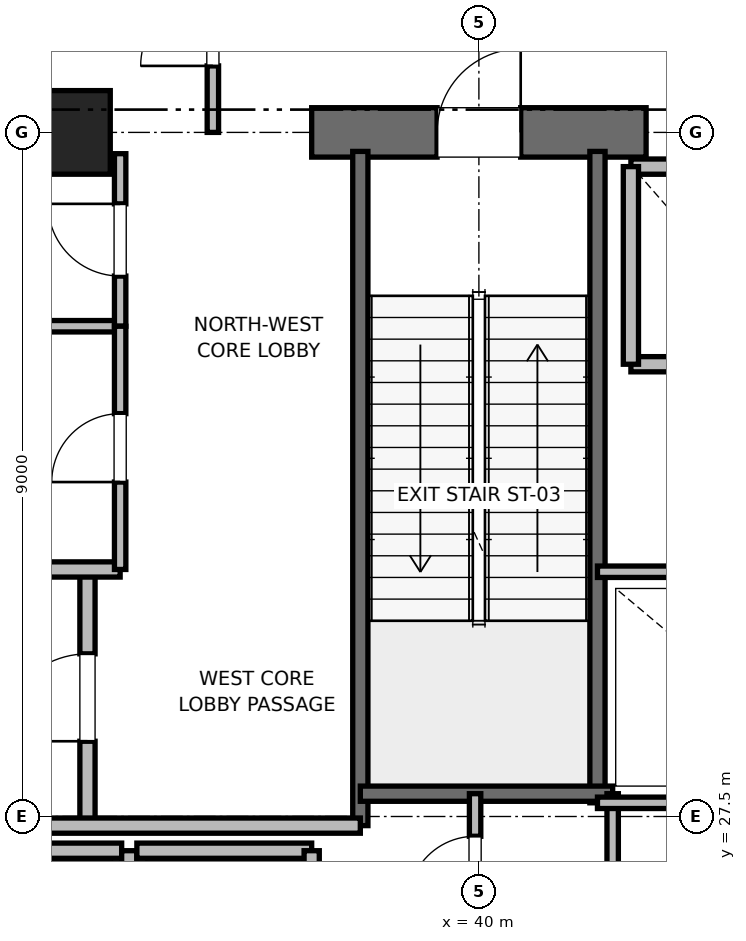
"""IFC4 building model, lengths in metres.
Left out: names, types, materials, properties, quantities, classifications, styles, units other than length and angle.
Written with IfcOpenShell. Run it as: python <this file> out.ifc"""

import sys

from ifc_helpers import new_model, si_unit, direction, frame, frame_2d, origin, origin_2d, place, context, subcontext, project, spatial, rectangle, extrude, element, fill, save


model = new_model("IFC4")
c1 = context("Model", 3, precision=1e-05, world=origin(), true_north=direction((0.0, 1.0)))
c2 = subcontext(c1, "Body", "Model", "MODEL_VIEW")
j1 = project(units=[si_unit("LENGTHUNIT", "METRE"), si_unit("PLANEANGLEUNIT", "RADIAN")], contexts=[c1])
p1 = place(None, origin())
s1 = spatial("IfcSite", under=j1, at=p1, CompositionType="ELEMENT")
p2 = place(p1, origin())
s2 = spatial("IfcBuilding", under=s1, at=p2, CompositionType="ELEMENT")
p3 = place(p2, frame((0.0, 0.0, 107.6)))
s3 = spatial("IfcBuildingStorey", under=s2, at=p3, CompositionType="ELEMENT", Elevation=107.6)
p4 = place(p3, frame((34.6, 36.5, 0.0), z_axis=(0.0, 0.0, 1.0), x_axis=(1.0, 0.0, 0.0)))
e1 = element("IfcColumn", 1, at=p4, inside=s3, PredefinedType="PILASTER", context=c2, shape_type="SweptSolid", body=[
    extrude(rectangle(XDim=1.1, YDim=1.1, at=origin_2d()), origin(), (0.0, 0.0, 1.0), 5.4),
])
p5 = place(p3, frame((29.0, 36.5, 0.0), z_axis=(0.0, 0.0, 1.0), x_axis=(1.0, 0.0, 0.0)))
e2 = element("IfcWall", 2, at=p5, inside=s3, PredefinedType="SHEAR", context=c2, shape_type="SweptSolid", body=[
    extrude(rectangle(XDim=5.8, YDim=0.65, at=frame_2d((2.9, 0.0))), origin(), (0.0, 0.0, 1.0), 5.1),
])
p6 = place(p3, frame((37.8, 36.5, 0.0), z_axis=(0.0, 0.0, 1.0), x_axis=(1.0, 0.0, 0.0)))
e3 = element("IfcWall", 3, at=p6, inside=s3, PredefinedType="SHEAR", context=c2, shape_type="SweptSolid", body=[
    extrude(rectangle(XDim=4.4, YDim=0.65, at=frame_2d((2.2, 0.0))), origin(), (0.0, 0.0, 1.0), 5.1),
])
p7 = place(p6, frame((1.65, 0.0, 0.0)))
e4 = element("IfcOpeningElement", 4, at=p7, cuts=e3, PredefinedType="OPENING", context=c2, shape_type="SweptSolid", body=[
    extrude(rectangle(XDim=1.1, YDim=2.15, at=frame_2d((0.55, 1.075))), frame((0.0, 0.325, 0.0), z_axis=(0.0, -1.0, 0.0), x_axis=(1.0, 0.0, 0.0)), (0.0, 0.0, 1.0), 0.65),
])
p8 = place(p3, frame((38.44, 27.38, 0.0), z_axis=(0.0, 0.0, 1.0), x_axis=(0.0, 1.0, 0.0)))
e5 = element("IfcWall", 5, at=p8, inside=s3, PredefinedType="SOLIDWALL", context=c2, shape_type="SweptSolid", body=[
    extrude(rectangle(XDim=8.87, YDim=0.2, at=frame_2d((4.435, 0.0))), origin(), (0.0, 0.0, 1.0), 5.1),
])
p9 = place(p3, frame((41.56, 27.68, 0.0), z_axis=(0.0, 0.0, 1.0), x_axis=(0.0, 1.0, 0.0)))
e6 = element("IfcWall", 6, at=p9, inside=s3, PredefinedType="SOLIDWALL", context=c2, shape_type="SweptSolid", body=[
    extrude(rectangle(XDim=8.57, YDim=0.2, at=frame_2d((4.285, 0.0))), origin(), (0.0, 0.0, 1.0), 5.1),
])
p10 = place(p3, frame((38.44, 27.8, 0.0), z_axis=(0.0, 0.0, 1.0), x_axis=(1.0, 0.0, 0.0)))
e7 = element("IfcWall", 7, at=p10, inside=s3, PredefinedType="SOLIDWALL", context=c2, shape_type="SweptSolid", body=[
    extrude(rectangle(XDim=3.32, YDim=0.2, at=frame_2d((1.66, 0.0))), origin(), (0.0, 0.0, 1.0), 5.1),
])
p11 = place(p3, frame((34.85, 27.38, 0.0), z_axis=(0.0, 0.0, 1.0), x_axis=(0.0, 1.0, 0.0)))
e8 = element("IfcWall", 8, at=p11, inside=s3, PredefinedType="PARTITIONING", context=c2, shape_type="SweptSolid", body=[
    extrude(rectangle(XDim=3.37, YDim=0.2, at=frame_2d((1.685, 0.0))), origin(), (0.0, 0.0, 1.0), 5.1),
])
p12 = place(p11, frame((1.11, 0.0, 0.0)))
e9 = element("IfcOpeningElement", 9, at=p12, cuts=e8, PredefinedType="OPENING", context=c2, shape_type="SweptSolid", body=[
    extrude(rectangle(XDim=1.15, YDim=2.2, at=frame_2d((0.575, 1.1))), frame((0.0, 0.1, 0.0), z_axis=(0.0, -1.0, 0.0), x_axis=(1.0, 0.0, 0.0)), (0.0, 0.0, 1.0), 0.2),
])
p13 = place(p3, frame((32.82, 27.38, 0.0), z_axis=(0.0, 0.0, 1.0), x_axis=(1.0, 0.0, 0.0)))
e10 = element("IfcWall", 10, at=p13, inside=s3, PredefinedType="PARTITIONING", context=c2, shape_type="SweptSolid", body=[
    extrude(rectangle(XDim=5.62, YDim=0.2, at=frame_2d((2.81, 0.0))), origin(), (0.0, 0.0, 1.0), 5.1),
])
p14 = place(p3, frame((32.15, 30.75, 0.0), z_axis=(0.0, 0.0, 1.0), x_axis=(1.0, 0.0, 0.0)))
e11 = element("IfcWall", 11, at=p14, inside=s3, PredefinedType="PARTITIONING", context=c2, shape_type="SweptSolid", body=[
    extrude(rectangle(XDim=3.13, YDim=0.2, at=frame_2d((1.565, 0.0))), origin(), (0.0, 0.0, 1.0), 5.1),
])
p15 = place(p3, frame((35.3, 27.05, 0.0), z_axis=(0.0, 0.0, 1.0), x_axis=(-1.0, 0.0, 0.0)))
e12 = element("IfcWall", 12, at=p15, inside=s3, PredefinedType="SOLIDWALL", context=c2, shape_type="SweptSolid", body=[
    extrude(rectangle(XDim=2.3, YDim=0.2, at=frame_2d((1.15, 0.0))), origin(), (0.0, 0.0, 1.0), 5.1),
])
p16 = place(p3, frame((35.4, 24.45, 0.0), z_axis=(0.0, 0.0, 1.0), x_axis=(0.0, 1.0, 0.0)))
e13 = element("IfcWall", 13, at=p16, inside=s3, PredefinedType="SOLIDWALL", context=c2, shape_type="SweptSolid", body=[
    extrude(rectangle(XDim=2.6, YDim=0.2, at=frame_2d((1.3, 0.0))), origin(), (0.0, 0.0, 1.0), 5.1),
])
p17 = place(p3, frame((37.8, 27.05, 0.0), z_axis=(0.0, 0.0, 1.0), x_axis=(-1.0, 0.0, 0.0)))
e14 = element("IfcWall", 14, at=p17, inside=s3, PredefinedType="SOLIDWALL", context=c2, shape_type="SweptSolid", body=[
    extrude(rectangle(XDim=2.3, YDim=0.2, at=frame_2d((1.15, 0.0))), origin(), (0.0, 0.0, 1.0), 5.1),
])
p18 = place(p3, frame((37.8, 24.45, 0.0), z_axis=(0.0, 0.0, 1.0), x_axis=(0.0, 1.0, 0.0)))
e15 = element("IfcWall", 15, at=p18, inside=s3, PredefinedType="SOLIDWALL", context=c2, shape_type="SweptSolid", body=[
    extrude(rectangle(XDim=2.6, YDim=0.2, at=frame_2d((1.3, 0.0))), origin(), (0.0, 0.0, 1.0), 5.1),
])
p19 = place(p3, frame((42.0, 33.45, 0.0), z_axis=(0.0, 0.0, 1.0), x_axis=(1.0, 0.0, 0.0)))
e16 = element("IfcWall", 16, at=p19, inside=s3, PredefinedType="SOLIDWALL", context=c2, shape_type="SweptSolid", body=[
    extrude(rectangle(XDim=2.3, YDim=0.2, at=frame_2d((1.15, 0.0))), origin(), (0.0, 0.0, 1.0), 5.1),
])
p20 = place(p3, frame((44.3, 36.05, 0.0), z_axis=(0.0, 0.0, 1.0), x_axis=(-1.0, 0.0, 0.0)))
e17 = element("IfcWall", 17, at=p20, inside=s3, PredefinedType="SOLIDWALL", context=c2, shape_type="SweptSolid", body=[
    extrude(rectangle(XDim=2.3, YDim=0.2, at=frame_2d((1.15, 0.0))), origin(), (0.0, 0.0, 1.0), 3.88),
])
p21 = place(p3, frame((42.0, 36.05, 0.0), z_axis=(0.0, 0.0, 1.0), x_axis=(0.0, -1.0, 0.0)))
e18 = element("IfcWall", 18, at=p21, inside=s3, PredefinedType="SOLIDWALL", context=c2, shape_type="SweptSolid", body=[
    extrude(rectangle(XDim=2.6, YDim=0.2, at=frame_2d((1.3, 0.0))), origin(), (0.0, 0.0, 1.0), 3.88),
])
p22 = place(p3, frame((41.76, 23.8, 0.0), z_axis=(0.0, 0.0, 1.0), x_axis=(0.0, 1.0, 0.0)))
e19 = element("IfcWall", 19, at=p22, inside=s3, PredefinedType="PARTITIONING", context=c2, shape_type="SweptSolid", body=[
    extrude(rectangle(XDim=4.0, YDim=0.15, at=frame_2d((2.0, 0.0))), origin(), (0.0, 0.0, 1.0), 2.85),
])
p23 = place(p3, frame((39.95, 25.8, 0.0), z_axis=(0.0, 0.0, 1.0), x_axis=(0.0, 1.0, 0.0)))
e20 = element("IfcWall", 20, at=p23, inside=s3, PredefinedType="PARTITIONING", context=c2, shape_type="SweptSolid", body=[
    extrude(rectangle(XDim=2.0, YDim=0.15, at=frame_2d((1.0, 0.0))), origin(), (0.0, 0.0, 1.0), 2.85),
])
p24 = place(p23, frame((0.56, 0.0, 0.0)))
e21 = element("IfcOpeningElement", 21, at=p24, cuts=e20, PredefinedType="OPENING", context=c2, shape_type="SweptSolid", body=[
    extrude(rectangle(XDim=0.88, YDim=2.1, at=frame_2d((0.44, 1.05))), frame((0.0, 0.075, 0.0), z_axis=(0.0, -1.0, 0.0), x_axis=(1.0, 0.0, 0.0)), (0.0, 0.0, 1.0), 0.15),
])
p25 = place(p3, frame((32.15, 33.95, 0.0), z_axis=(0.0, 0.0, 1.0), x_axis=(1.0, 0.0, 0.0)))
e22 = element("IfcWall", 22, at=p25, inside=s3, PredefinedType="PARTITIONING", context=c2, shape_type="SweptSolid", body=[
    extrude(rectangle(XDim=3.13, YDim=0.15, at=frame_2d((1.565, 0.0))), origin(), (0.0, 0.0, 1.0), 2.85),
])
p26 = place(p3, frame((35.28, 33.95, 0.0), z_axis=(0.0, 0.0, 1.0), x_axis=(0.0, 1.0, 0.0)))
e23 = element("IfcWall", 23, at=p26, inside=s3, PredefinedType="PARTITIONING", context=c2, shape_type="SweptSolid", body=[
    extrude(rectangle(XDim=2.27, YDim=0.15, at=frame_2d((1.135, 0.0))), origin(), (0.0, 0.0, 1.0), 2.85),
])
p27 = place(p26, frame((0.66, 0.0, 0.0)))
e24 = element("IfcOpeningElement", 24, at=p27, cuts=e23, PredefinedType="OPENING", context=c2, shape_type="SweptSolid", body=[
    extrude(rectangle(XDim=0.95, YDim=2.15, at=frame_2d((0.475, 1.075))), frame((0.0, 0.075, 0.0), z_axis=(0.0, -1.0, 0.0), x_axis=(1.0, 0.0, 0.0)), (0.0, 0.0, 1.0), 0.15),
])
p28 = place(p3, frame((35.28, 30.75, 0.0), z_axis=(0.0, 0.0, 1.0), x_axis=(0.0, 1.0, 0.0)))
e25 = element("IfcWall", 25, at=p28, inside=s3, PredefinedType="PARTITIONING", context=c2, shape_type="SweptSolid", body=[
    extrude(rectangle(XDim=3.2, YDim=0.15, at=frame_2d((1.6, 0.0))), origin(), (0.0, 0.0, 1.0), 2.85),
])
p29 = place(p28, frame((1.15, 0.0, 0.0)))
e26 = element("IfcOpeningElement", 26, at=p29, cuts=e25, PredefinedType="OPENING", context=c2, shape_type="SweptSolid", body=[
    extrude(rectangle(XDim=0.9, YDim=2.1, at=frame_2d((0.45, 1.05))), frame((0.0, 0.075, 0.0), z_axis=(0.0, -1.0, 0.0), x_axis=(1.0, 0.0, 0.0)), (0.0, 0.0, 1.0), 0.15),
])
p30 = place(p3, frame((41.56, 27.68, 0.0), z_axis=(0.0, 0.0, 1.0), x_axis=(1.0, 0.0, 0.0)))
e27 = element("IfcWall", 27, at=p30, inside=s3, PredefinedType="PARTITIONING", context=c2, shape_type="SweptSolid", body=[
    extrude(rectangle(XDim=3.59, YDim=0.15, at=frame_2d((1.795, 0.0))), origin(), (0.0, 0.0, 1.0), 2.85),
])
p31 = place(p3, frame((41.56, 30.72, 0.0), z_axis=(0.0, 0.0, 1.0), x_axis=(1.0, 0.0, 0.0)))
e28 = element("IfcWall", 28, at=p31, inside=s3, PredefinedType="PARTITIONING", context=c2, shape_type="SweptSolid", body=[
    extrude(rectangle(XDim=3.59, YDim=0.15, at=frame_2d((1.795, 0.0))), origin(), (0.0, 0.0, 1.0), 2.85),
])
p32 = place(p31, frame((1.355, 0.0, 0.0)))
e29 = element("IfcOpeningElement", 29, at=p32, cuts=e28, PredefinedType="OPENING", context=c2, shape_type="SweptSolid", body=[
    extrude(rectangle(XDim=0.88, YDim=2.1, at=frame_2d((0.44, 1.05))), frame((0.0, 0.075, 0.0), z_axis=(0.0, -1.0, 0.0), x_axis=(1.0, 0.0, 0.0)), (0.0, 0.0, 1.0), 0.15),
])
p33 = place(p3, frame((36.5, 36.5, 0.0), z_axis=(0.0, 0.0, 1.0), x_axis=(0.0, 1.0, 0.0)))
e30 = element("IfcWall", 30, at=p33, inside=s3, PredefinedType="PARTITIONING", context=c2, shape_type="SweptSolid", body=[
    extrude(rectangle(XDim=2.7, YDim=0.15, at=frame_2d((1.35, 0.0))), origin(), (0.0, 0.0, 1.0), 2.85),
])
p34 = place(p33, frame((0.875, 0.0, 0.0)))
e31 = element("IfcOpeningElement", 31, at=p34, cuts=e30, PredefinedType="OPENING", context=c2, shape_type="SweptSolid", body=[
    extrude(rectangle(XDim=0.95, YDim=2.15, at=frame_2d((0.475, 1.075))), frame((0.0, 0.075, 0.0), z_axis=(0.0, -1.0, 0.0), x_axis=(1.0, 0.0, 0.0)), (0.0, 0.0, 1.0), 0.15),
])
p35 = place(p7, origin())
e32 = element("IfcDoor", 32, at=p35, inside=s3, OperationType="SINGLE_SWING_RIGHT", PredefinedType="DOOR", context=c2, shape_type="SweptSolid", body=[
    extrude(rectangle(XDim=1.1, YDim=2.15, at=frame_2d((0.55, 1.075))), frame((0.0, 0.025, 0.0), z_axis=(0.0, -1.0, 0.0), x_axis=(1.0, 0.0, 0.0)), (0.0, 0.0, 1.0), 0.05),
])
fill(e4, e32)
p36 = place(p12, origin())
e33 = element("IfcDoor", 33, at=p36, inside=s3, OperationType="SINGLE_SWING_LEFT", PredefinedType="DOOR", context=c2, shape_type="SweptSolid", body=[
    extrude(rectangle(XDim=1.15, YDim=2.2, at=frame_2d((0.575, 1.1))), frame((0.0, 0.025, 0.0), z_axis=(0.0, -1.0, 0.0), x_axis=(1.0, 0.0, 0.0)), (0.0, 0.0, 1.0), 0.05),
])
fill(e9, e33)
p37 = place(p24, origin())
e34 = element("IfcDoor", 34, at=p37, inside=s3, OperationType="SINGLE_SWING_LEFT", PredefinedType="DOOR", context=c2, shape_type="SweptSolid", body=[
    extrude(rectangle(XDim=0.88, YDim=2.1, at=frame_2d((0.44, 1.05))), frame((0.0, 0.025, 0.0), z_axis=(0.0, -1.0, 0.0), x_axis=(1.0, 0.0, 0.0)), (0.0, 0.0, 1.0), 0.05),
])
fill(e21, e34)
p38 = place(p27, origin())
e35 = element("IfcDoor", 35, at=p38, inside=s3, OperationType="SINGLE_SWING_RIGHT", PredefinedType="DOOR", context=c2, shape_type="SweptSolid", body=[
    extrude(rectangle(XDim=0.95, YDim=2.15, at=frame_2d((0.475, 1.075))), frame((0.0, 0.025, 0.0), z_axis=(0.0, -1.0, 0.0), x_axis=(1.0, 0.0, 0.0)), (0.0, 0.0, 1.0), 0.05),
])
fill(e24, e35)
p39 = place(p29, origin())
e36 = element("IfcDoor", 36, at=p39, inside=s3, OperationType="SINGLE_SWING_LEFT", PredefinedType="DOOR", context=c2, shape_type="SweptSolid", body=[
    extrude(rectangle(XDim=0.9, YDim=2.1, at=frame_2d((0.45, 1.05))), frame((0.0, 0.025, 0.0), z_axis=(0.0, -1.0, 0.0), x_axis=(1.0, 0.0, 0.0)), (0.0, 0.0, 1.0), 0.05),
])
fill(e26, e36)
p40 = place(p34, origin())
e37 = element("IfcDoor", 37, at=p40, inside=s3, OperationType="SINGLE_SWING_LEFT", PredefinedType="DOOR", context=c2, shape_type="SweptSolid", body=[
    extrude(rectangle(XDim=0.95, YDim=2.15, at=frame_2d((0.475, 1.075))), frame((0.0, 0.025, 0.0), z_axis=(0.0, -1.0, 0.0), x_axis=(1.0, 0.0, 0.0)), (0.0, 0.0, 1.0), 0.05),
])
fill(e31, e37)
save(model, sys.argv[1])
